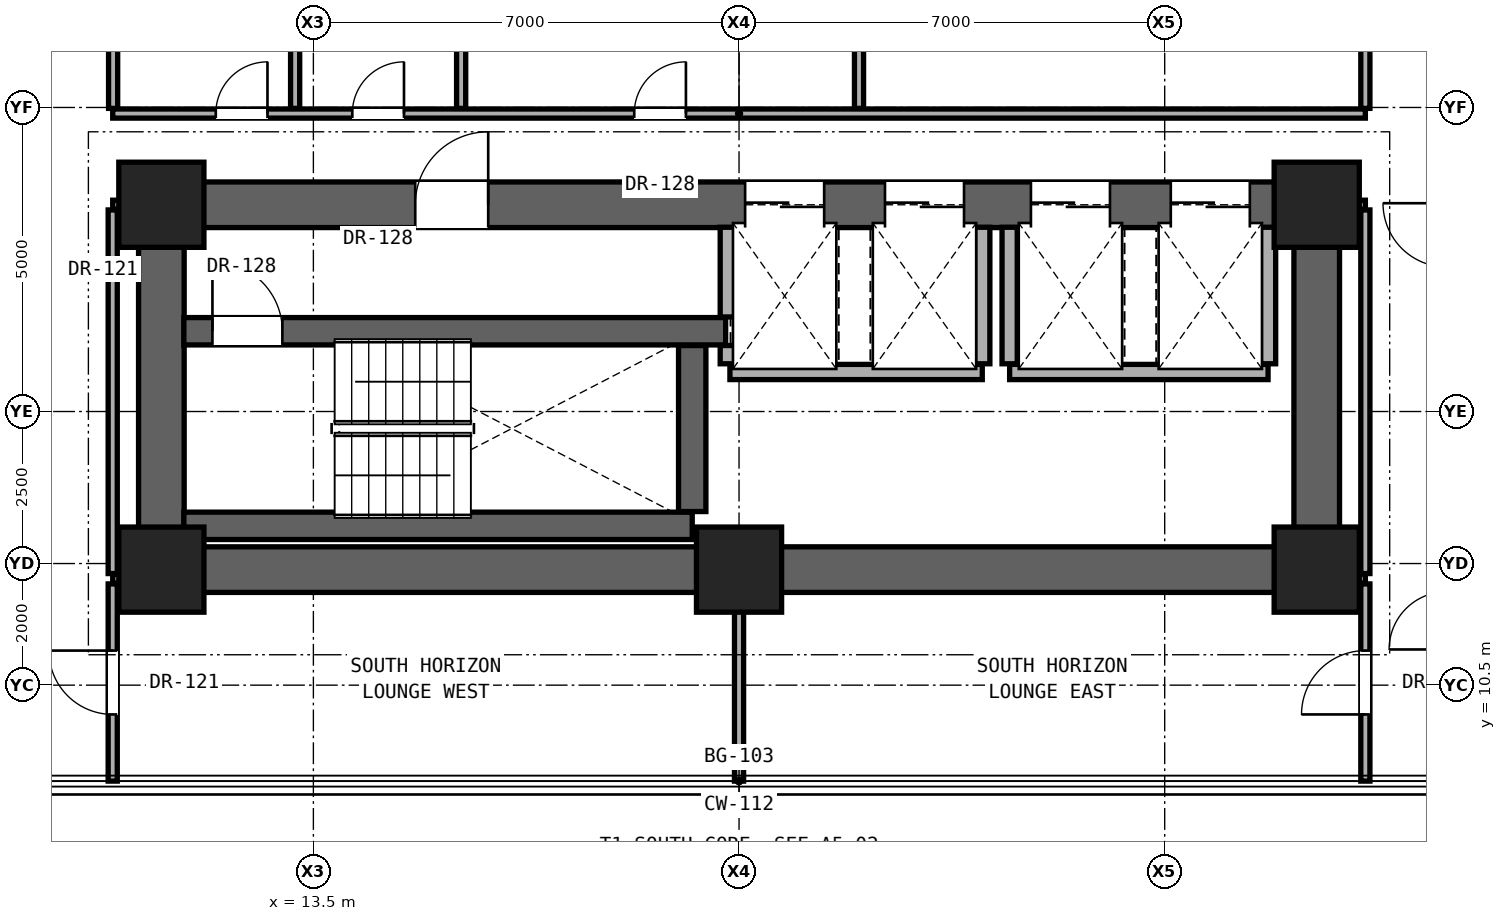
"""IFC4 building model, lengths in metres.
Left out: names, types, materials, properties, quantities, classifications, styles, units other than length and angle.
Written with IfcOpenShell. Run it as: python <this file> out.ifc"""

import sys

from ifc_helpers import new_model, si_unit, direction, frame, frame_2d, origin, origin_2d, place, context, subcontext, project, spatial, rectangle, extrude, element, fill, save


model = new_model("IFC4")
c1 = context("Model", 3, precision=1e-05, world=origin(), true_north=direction((0.0, 1.0)))
c2 = subcontext(c1, "Body", "Model", "MODEL_VIEW")
j1 = project(units=[si_unit("LENGTHUNIT", "METRE"), si_unit("PLANEANGLEUNIT", "RADIAN")], contexts=[c1])
p1 = place(None, origin())
s1 = spatial("IfcSite", under=j1, at=p1, CompositionType="ELEMENT")
p2 = place(p1, origin())
s2 = spatial("IfcBuilding", under=s1, at=p2, CompositionType="ELEMENT")
p3 = place(p2, frame((0.0, 0.0, 25.7)))
s3 = spatial("IfcBuildingStorey", under=s2, at=p3, CompositionType="ELEMENT", Elevation=25.7)
for number, where, z_axis, x_axis in (
    (1, (11.0, 12.4, 0.0), (0.0, 0.0, 1.0), (1.0, 0.0, 0.0)),
    (2, (20.5, 12.4, 0.0), (0.0, 0.0, 1.0), (1.0, 0.0, 0.0)),
    (3, (30.0, 12.4, 0.0), (0.0, 0.0, 1.0), (1.0, 0.0, 0.0)),
    (4, (11.0, 18.4, 0.0), (0.0, 0.0, 1.0), (1.0, 0.0, 0.0)),
    (5, (30.0, 18.4, 0.0), (0.0, 0.0, 1.0), (1.0, 0.0, 0.0)),
):
    element("IfcColumn", number, at=place(p3, frame(where, z_axis=z_axis, x_axis=x_axis)), inside=s3, PredefinedType="COLUMN", context=c2, shape_type="SweptSolid", body=[
        extrude(rectangle(XDim=1.4, YDim=1.4, at=origin_2d()), origin(), (0.0, 0.0, 1.0), 3.3),
    ])
p4 = place(p3, frame((11.0, 12.4, 0.0), z_axis=(0.0, 0.0, 1.0), x_axis=(1.0, 0.0, 0.0)))
e6 = element("IfcWall", 6, at=p4, inside=s3, PredefinedType="SHEAR", context=c2, shape_type="SweptSolid", body=[
    extrude(rectangle(XDim=19.0, YDim=0.75, at=frame_2d((9.5, 0.0))), origin(), (0.0, 0.0, 1.0), 3.06),
])
for number, where, z_axis, x_axis in (
    (7, (11.0, 12.4, 0.0), (0.0, 0.0, 1.0), (0.0, 1.0, 0.0)),
    (8, (30.0, 12.4, 0.0), (0.0, 0.0, 1.0), (0.0, 1.0, 0.0)),
):
    element("IfcWall", number, at=place(p3, frame(where, z_axis=z_axis, x_axis=x_axis)), inside=s3, PredefinedType="SHEAR", context=c2, shape_type="SweptSolid", body=[
        extrude(rectangle(XDim=6.0, YDim=0.75, at=frame_2d((3.0, 0.0))), origin(), (0.0, 0.0, 1.0), 3.06),
    ])
p5 = place(p3, frame((11.0, 18.4, 0.0), z_axis=(0.0, 0.0, 1.0), x_axis=(1.0, 0.0, 0.0)))
e9 = element("IfcWall", 9, at=p5, inside=s3, PredefinedType="SHEAR", context=c2, shape_type="SweptSolid", body=[
    extrude(rectangle(XDim=19.0, YDim=0.75, at=frame_2d((9.5, 0.0))), origin(), (0.0, 0.0, 1.0), 3.06),
])
p6 = place(p5, frame((4.175, 0.0, 0.0)))
e10 = element("IfcOpeningElement", 10, at=p6, cuts=e9, PredefinedType="OPENING", context=c2, shape_type="SweptSolid", body=[
    extrude(rectangle(XDim=1.2, YDim=2.25, at=frame_2d((0.6, 1.125))), frame((0.0, 0.385, 0.0), z_axis=(0.0, -1.0, 0.0), x_axis=(1.0, 0.0, 0.0)), (0.0, 0.0, 1.0), 0.77),
])
p7 = place(p5, frame((9.6, 0.0, 0.0)))
e11 = element("IfcOpeningElement", 11, at=p7, cuts=e9, PredefinedType="OPENING", context=c2, shape_type="SweptSolid", body=[
    extrude(rectangle(XDim=1.3, YDim=2.3, at=frame_2d((0.65, 1.15))), frame((0.0, 0.385, 0.0), z_axis=(0.0, -1.0, 0.0), x_axis=(1.0, 0.0, 0.0)), (0.0, 0.0, 1.0), 0.77),
])
p8 = place(p5, frame((11.9, 0.0, 0.0)))
e12 = element("IfcOpeningElement", 12, at=p8, cuts=e9, PredefinedType="OPENING", context=c2, shape_type="SweptSolid", body=[
    extrude(rectangle(XDim=1.3, YDim=2.3, at=frame_2d((0.65, 1.15))), frame((0.0, 0.385, 0.0), z_axis=(0.0, -1.0, 0.0), x_axis=(1.0, 0.0, 0.0)), (0.0, 0.0, 1.0), 0.77),
])
p9 = place(p5, frame((14.3, 0.0, 0.0)))
e13 = element("IfcOpeningElement", 13, at=p9, cuts=e9, PredefinedType="OPENING", context=c2, shape_type="SweptSolid", body=[
    extrude(rectangle(XDim=1.3, YDim=2.3, at=frame_2d((0.65, 1.15))), frame((0.0, 0.385, 0.0), z_axis=(0.0, -1.0, 0.0), x_axis=(1.0, 0.0, 0.0)), (0.0, 0.0, 1.0), 0.77),
])
p10 = place(p5, frame((16.6, 0.0, 0.0)))
e14 = element("IfcOpeningElement", 14, at=p10, cuts=e9, PredefinedType="OPENING", context=c2, shape_type="SweptSolid", body=[
    extrude(rectangle(XDim=1.3, YDim=2.3, at=frame_2d((0.65, 1.15))), frame((0.0, 0.385, 0.0), z_axis=(0.0, -1.0, 0.0), x_axis=(1.0, 0.0, 0.0)), (0.0, 0.0, 1.0), 0.77),
])
for number, where, z_axis, x_axis in (
    (15, (10.2, 12.25, 0.0), (0.0, 0.0, 1.0), (1.0, 0.0, 0.0)),
    (16, (30.37, 12.25, 0.0), (0.0, 0.0, 1.0), (1.0, 0.0, 0.0)),
):
    element("IfcWall", number, at=place(p3, frame(where, z_axis=z_axis, x_axis=x_axis)), inside=s3, PredefinedType="PARTITIONING", context=c2, shape_type="SweptSolid", body=[
        extrude(rectangle(XDim=0.43, YDim=0.15, at=frame_2d((0.215, 0.0))), origin(), (0.0, 0.0, 1.0), 3.06),
    ])
p11 = place(p3, frame((11.37, 13.12, 0.0), z_axis=(0.0, 0.0, 1.0), x_axis=(1.0, 0.0, 0.0)))
e17 = element("IfcWall", 17, at=p11, inside=s3, PredefinedType="SHEAR", context=c2, shape_type="SweptSolid", body=[
    extrude(rectangle(XDim=8.36, YDim=0.45, at=frame_2d((4.18, 0.0))), origin(), (0.0, 0.0, 1.0), 3.06),
])
p12 = place(p3, frame((20.35, 15.65, 0.0), z_axis=(0.0, 0.0, 1.0), x_axis=(1.0, 0.0, 0.0)))
e18 = element("IfcWall", 18, at=p12, inside=s3, PredefinedType="SOLIDWALL", context=c2, shape_type="SweptSolid", body=[
    extrude(rectangle(XDim=4.15, YDim=0.25, at=frame_2d((2.075, 0.0))), origin(), (0.0, 0.0, 1.0), 3.06),
])
p13 = place(p3, frame((24.95, 15.65, 0.0), z_axis=(0.0, 0.0, 1.0), x_axis=(1.0, 0.0, 0.0)))
e19 = element("IfcWall", 19, at=p13, inside=s3, PredefinedType="SOLIDWALL", context=c2, shape_type="SweptSolid", body=[
    extrude(rectangle(XDim=4.25, YDim=0.25, at=frame_2d((2.125, 0.0))), origin(), (0.0, 0.0, 1.0), 3.06),
])
p14 = place(p3, frame((11.37, 16.32, 0.0), z_axis=(0.0, 0.0, 1.0), x_axis=(1.0, 0.0, 0.0)))
e20 = element("IfcWall", 20, at=p14, inside=s3, PredefinedType="SHEAR", context=c2, shape_type="SweptSolid", body=[
    extrude(rectangle(XDim=8.91, YDim=0.45, at=frame_2d((4.455, 0.0))), origin(), (0.0, 0.0, 1.0), 3.06),
])
p15 = place(p14, frame((0.47, 0.0, 0.0)))
e21 = element("IfcOpeningElement", 21, at=p15, cuts=e20, PredefinedType="OPENING", context=c2, shape_type="SweptSolid", body=[
    extrude(rectangle(XDim=1.15, YDim=2.2, at=frame_2d((0.575, 1.1))), frame((0.0, 0.235, 0.0), z_axis=(0.0, -1.0, 0.0), x_axis=(1.0, 0.0, 0.0)), (0.0, 0.0, 1.0), 0.47),
])
for number, where, z_axis, x_axis in (
    (22, (10.2, 18.4, 0.0), (0.0, 0.0, 1.0), (1.0, 0.0, 0.0)),
    (23, (30.37, 18.4, 0.0), (0.0, 0.0, 1.0), (1.0, 0.0, 0.0)),
):
    element("IfcWall", number, at=place(p3, frame(where, z_axis=z_axis, x_axis=x_axis)), inside=s3, PredefinedType="PARTITIONING", context=c2, shape_type="SweptSolid", body=[
        extrude(rectangle(XDim=0.43, YDim=0.15, at=frame_2d((0.215, 0.0))), origin(), (0.0, 0.0, 1.0), 2.436),
    ])
p16 = place(p3, frame((10.2, 19.9, 0.0), z_axis=(0.0, 0.0, 1.0), x_axis=(1.0, 0.0, 0.0)))
e24 = element("IfcWall", 24, at=p16, inside=s3, PredefinedType="PARTITIONING", context=c2, shape_type="SweptSolid", body=[
    extrude(rectangle(XDim=20.6, YDim=0.15, at=frame_2d((10.3, 0.0))), origin(), (0.0, 0.0, 1.0), 2.104),
])
p17 = place(p16, frame((1.695, 0.0, 0.0)))
e25 = element("IfcOpeningElement", 25, at=p17, cuts=e24, PredefinedType="OPENING", context=c2, shape_type="SweptSolid", body=[
    extrude(rectangle(XDim=0.85, YDim=2.01, at=frame_2d((0.425, 1.005))), frame((0.0, 0.085, 0.0), z_axis=(0.0, -1.0, 0.0), x_axis=(1.0, 0.0, 0.0)), (0.0, 0.0, 1.0), 0.17),
])
p18 = place(p16, frame((3.94, 0.0, 0.0)))
e26 = element("IfcOpeningElement", 26, at=p18, cuts=e24, PredefinedType="OPENING", context=c2, shape_type="SweptSolid", body=[
    extrude(rectangle(XDim=0.85, YDim=2.01, at=frame_2d((0.425, 1.005))), frame((0.0, 0.085, 0.0), z_axis=(0.0, -1.0, 0.0), x_axis=(1.0, 0.0, 0.0)), (0.0, 0.0, 1.0), 0.17),
])
p19 = place(p16, frame((8.576, 0.0, 0.0)))
e27 = element("IfcOpeningElement", 27, at=p19, cuts=e24, PredefinedType="OPENING", context=c2, shape_type="SweptSolid", body=[
    extrude(rectangle(XDim=0.85, YDim=2.01, at=frame_2d((0.425, 1.005))), frame((0.0, 0.085, 0.0), z_axis=(0.0, -1.0, 0.0), x_axis=(1.0, 0.0, 0.0)), (0.0, 0.0, 1.0), 0.17),
])
p20 = place(p3, frame((10.2, 8.922, 0.0), z_axis=(0.0, 0.0, 1.0), x_axis=(0.0, 1.0, 0.0)))
e28 = element("IfcWall", 28, at=p20, inside=s3, PredefinedType="PARTITIONING", context=c2, shape_type="SweptSolid", body=[
    extrude(rectangle(XDim=3.243, YDim=0.15, at=frame_2d((1.622, 0.0))), origin(), (0.0, 0.0, 1.0), 3.06),
])
p21 = place(p20, frame((1.096, 0.0, 0.0)))
e29 = element("IfcOpeningElement", 29, at=p21, cuts=e28, PredefinedType="OPENING", context=c2, shape_type="SweptSolid", body=[
    extrude(rectangle(XDim=1.05, YDim=2.2, at=frame_2d((0.525, 1.1))), frame((0.0, 0.085, 0.0), z_axis=(0.0, -1.0, 0.0), x_axis=(1.0, 0.0, 0.0)), (0.0, 0.0, 1.0), 0.17),
])
p22 = place(p3, frame((10.2, 12.335, 0.0), z_axis=(0.0, 0.0, 1.0), x_axis=(0.0, 1.0, 0.0)))
e30 = element("IfcWall", 30, at=p22, inside=s3, PredefinedType="PARTITIONING", context=c2, shape_type="SweptSolid", body=[
    extrude(rectangle(XDim=5.98, YDim=0.15, at=frame_2d((2.99, 0.0))), origin(), (0.0, 0.0, 1.0), 2.436),
])
for number, where, z_axis, x_axis in (
    (31, (10.207, 19.985, 0.0), (0.0, 0.0, 1.0), (0.0, 1.0, 0.0)),
    (32, (13.2, 19.985, 0.0), (0.0, 0.0, 1.0), (0.0, 1.0, 0.0)),
):
    element("IfcWall", number, at=place(p3, frame(where, z_axis=z_axis, x_axis=x_axis)), inside=s3, PredefinedType="PARTITIONING", context=c2, shape_type="SweptSolid", body=[
        extrude(rectangle(XDim=2.78, YDim=0.15, at=frame_2d((1.39, 0.0))), origin(), (0.0, 0.0, 1.0), 3.06),
    ])
p23 = place(p3, frame((15.93, 19.985, 0.0), z_axis=(0.0, 0.0, 1.0), x_axis=(0.0, 1.0, 0.0)))
e33 = element("IfcWall", 33, at=p23, inside=s3, PredefinedType="PARTITIONING", context=c2, shape_type="SweptSolid", body=[
    extrude(rectangle(XDim=2.78, YDim=0.15, at=frame_2d((1.39, 0.0))), origin(), (0.0, 0.0, 1.0), 2.589),
])
p24 = place(p3, frame((19.73, 13.355, 0.0), z_axis=(0.0, 0.0, 1.0), x_axis=(0.0, 1.0, 0.0)))
e34 = element("IfcWall", 34, at=p24, inside=s3, PredefinedType="SHEAR", context=c2, shape_type="SweptSolid", body=[
    extrude(rectangle(XDim=2.73, YDim=0.45, at=frame_2d((1.365, 0.0))), origin(), (0.0, 0.0, 1.0), 3.06),
])
p25 = place(p3, frame((20.315, 15.785, 0.0), z_axis=(0.0, 0.0, 1.0), x_axis=(0.0, 1.0, 0.0)))
e35 = element("IfcWall", 35, at=p25, inside=s3, PredefinedType="SOLIDWALL", context=c2, shape_type="SweptSolid", body=[
    extrude(rectangle(XDim=0.3, YDim=0.25, at=frame_2d((0.15, 0.0))), origin(), (0.0, 0.0, 1.0), 3.06),
])
p26 = place(p3, frame((20.315, 16.555, 0.0), z_axis=(0.0, 0.0, 1.0), x_axis=(0.0, 1.0, 0.0)))
e36 = element("IfcWall", 36, at=p26, inside=s3, PredefinedType="SOLIDWALL", context=c2, shape_type="SweptSolid", body=[
    extrude(rectangle(XDim=1.475, YDim=0.25, at=frame_2d((0.738, 0.0))), origin(), (0.0, 0.0, 1.0), 3.06),
])
p27 = place(p3, frame((20.5, 8.922, 0.0), z_axis=(0.0, 0.0, 1.0), x_axis=(0.0, 1.0, 0.0)))
e37 = element("IfcWall", 37, at=p27, inside=s3, PredefinedType="PARTITIONING", context=c2, shape_type="SweptSolid", body=[
    extrude(rectangle(XDim=3.108, YDim=0.15, at=frame_2d((1.554, 0.0))), origin(), (0.0, 0.0, 1.0), 3.06),
])
p28 = place(p3, frame((22.473, 19.985, 0.0), z_axis=(0.0, 0.0, 1.0), x_axis=(0.0, 1.0, 0.0)))
e38 = element("IfcWall", 38, at=p28, inside=s3, PredefinedType="PARTITIONING", context=c2, shape_type="SweptSolid", body=[
    extrude(rectangle(XDim=13.03, YDim=0.15, at=frame_2d((6.515, 0.0))), origin(), (0.0, 0.0, 1.0), 2.104),
])
for number, where, z_axis, x_axis in (
    (39, (24.5, 15.785, 0.0), (0.0, 0.0, 1.0), (0.0, 1.0, 0.0)),
    (40, (24.95, 15.785, 0.0), (0.0, 0.0, 1.0), (0.0, 1.0, 0.0)),
    (41, (29.2, 15.785, 0.0), (0.0, 0.0, 1.0), (0.0, 1.0, 0.0)),
):
    element("IfcWall", number, at=place(p3, frame(where, z_axis=z_axis, x_axis=x_axis)), inside=s3, PredefinedType="SOLIDWALL", context=c2, shape_type="SweptSolid", body=[
        extrude(rectangle(XDim=2.245, YDim=0.25, at=frame_2d((1.123, 0.0))), origin(), (0.0, 0.0, 1.0), 3.06),
    ])
p29 = place(p3, frame((30.8, 8.922, 0.0), z_axis=(0.0, 0.0, 1.0), x_axis=(0.0, 1.0, 0.0)))
e42 = element("IfcWall", 42, at=p29, inside=s3, PredefinedType="PARTITIONING", context=c2, shape_type="SweptSolid", body=[
    extrude(rectangle(XDim=3.243, YDim=0.15, at=frame_2d((1.622, 0.0))), origin(), (0.0, 0.0, 1.0), 3.06),
])
p30 = place(p29, frame((1.096, 0.0, 0.0)))
e43 = element("IfcOpeningElement", 43, at=p30, cuts=e42, PredefinedType="OPENING", context=c2, shape_type="SweptSolid", body=[
    extrude(rectangle(XDim=1.05, YDim=2.2, at=frame_2d((0.525, 1.1))), frame((0.0, 0.085, 0.0), z_axis=(0.0, -1.0, 0.0), x_axis=(1.0, 0.0, 0.0)), (0.0, 0.0, 1.0), 0.17),
])
p31 = place(p3, frame((30.8, 12.335, 0.0), z_axis=(0.0, 0.0, 1.0), x_axis=(0.0, 1.0, 0.0)))
e44 = element("IfcWall", 44, at=p31, inside=s3, PredefinedType="PARTITIONING", context=c2, shape_type="SweptSolid", body=[
    extrude(rectangle(XDim=5.98, YDim=0.15, at=frame_2d((2.99, 0.0))), origin(), (0.0, 0.0, 1.0), 2.436),
])
p32 = place(p3, frame((30.8, 19.985, 0.0), z_axis=(0.0, 0.0, 1.0), x_axis=(0.0, 1.0, 0.0)))
e45 = element("IfcWall", 45, at=p32, inside=s3, PredefinedType="PARTITIONING", context=c2, shape_type="SweptSolid", body=[
    extrude(rectangle(XDim=13.03, YDim=0.15, at=frame_2d((6.515, 0.0))), origin(), (0.0, 0.0, 1.0), 2.279),
])
p33 = place(p6, origin())
e46 = element("IfcDoor", 46, at=p33, inside=s3, OperationType="SINGLE_SWING_RIGHT", PredefinedType="DOOR", context=c2, shape_type="SweptSolid", body=[
    extrude(rectangle(XDim=1.2, YDim=2.25, at=frame_2d((0.6, 1.125))), frame((0.0, 0.025, 0.0), z_axis=(0.0, -1.0, 0.0), x_axis=(1.0, 0.0, 0.0)), (0.0, 0.0, 1.0), 0.05),
])
fill(e10, e46)
p34 = place(p15, origin())
e47 = element("IfcDoor", 47, at=p34, inside=s3, OperationType="SINGLE_SWING_LEFT", PredefinedType="DOOR", context=c2, shape_type="SweptSolid", body=[
    extrude(rectangle(XDim=1.15, YDim=2.2, at=frame_2d((0.575, 1.1))), frame((0.0, 0.025, 0.0), z_axis=(0.0, -1.0, 0.0), x_axis=(1.0, 0.0, 0.0)), (0.0, 0.0, 1.0), 0.05),
])
fill(e21, e47)
p35 = place(p17, origin())
e48 = element("IfcDoor", 48, at=p35, inside=s3, OperationType="SINGLE_SWING_RIGHT", PredefinedType="DOOR", context=c2, shape_type="SweptSolid", body=[
    extrude(rectangle(XDim=0.85, YDim=2.01, at=frame_2d((0.425, 1.005))), frame((0.0, 0.025, 0.0), z_axis=(0.0, -1.0, 0.0), x_axis=(1.0, 0.0, 0.0)), (0.0, 0.0, 1.0), 0.05),
])
fill(e25, e48)
p36 = place(p18, origin())
e49 = element("IfcDoor", 49, at=p36, inside=s3, OperationType="SINGLE_SWING_RIGHT", PredefinedType="DOOR", context=c2, shape_type="SweptSolid", body=[
    extrude(rectangle(XDim=0.85, YDim=2.01, at=frame_2d((0.425, 1.005))), frame((0.0, 0.025, 0.0), z_axis=(0.0, -1.0, 0.0), x_axis=(1.0, 0.0, 0.0)), (0.0, 0.0, 1.0), 0.05),
])
fill(e26, e49)
p37 = place(p19, origin())
e50 = element("IfcDoor", 50, at=p37, inside=s3, OperationType="SINGLE_SWING_RIGHT", PredefinedType="DOOR", context=c2, shape_type="SweptSolid", body=[
    extrude(rectangle(XDim=0.85, YDim=2.01, at=frame_2d((0.425, 1.005))), frame((0.0, 0.025, 0.0), z_axis=(0.0, -1.0, 0.0), x_axis=(1.0, 0.0, 0.0)), (0.0, 0.0, 1.0), 0.05),
])
fill(e27, e50)
p38 = place(p21, origin())
e51 = element("IfcDoor", 51, at=p38, inside=s3, OperationType="SINGLE_SWING_RIGHT", PredefinedType="DOOR", context=c2, shape_type="SweptSolid", body=[
    extrude(rectangle(XDim=1.05, YDim=2.2, at=frame_2d((0.525, 1.1))), frame((0.0, 0.025, 0.0), z_axis=(0.0, -1.0, 0.0), x_axis=(1.0, 0.0, 0.0)), (0.0, 0.0, 1.0), 0.05),
])
fill(e29, e51)
p39 = place(p30, origin())
e52 = element("IfcDoor", 52, at=p39, inside=s3, OperationType="SINGLE_SWING_LEFT", PredefinedType="DOOR", context=c2, shape_type="SweptSolid", body=[
    extrude(rectangle(XDim=1.05, YDim=2.2, at=frame_2d((0.525, 1.1))), frame((0.0, 0.025, 0.0), z_axis=(0.0, -1.0, 0.0), x_axis=(1.0, 0.0, 0.0)), (0.0, 0.0, 1.0), 0.05),
])
fill(e43, e52)
p40 = place(p7, origin())
e53 = element("IfcDoor", 53, at=p40, inside=s3, OperationType="DOUBLE_DOOR_SLIDING", PredefinedType="DOOR", context=c2, shape_type="SweptSolid", body=[
    extrude(rectangle(XDim=1.3, YDim=2.3, at=frame_2d((0.65, 1.15))), frame((0.0, 0.025, 0.0), z_axis=(0.0, -1.0, 0.0), x_axis=(1.0, 0.0, 0.0)), (0.0, 0.0, 1.0), 0.05),
])
fill(e11, e53)
p41 = place(p8, origin())
e54 = element("IfcDoor", 54, at=p41, inside=s3, OperationType="DOUBLE_DOOR_SLIDING", PredefinedType="DOOR", context=c2, shape_type="SweptSolid", body=[
    extrude(rectangle(XDim=1.3, YDim=2.3, at=frame_2d((0.65, 1.15))), frame((0.0, 0.025, 0.0), z_axis=(0.0, -1.0, 0.0), x_axis=(1.0, 0.0, 0.0)), (0.0, 0.0, 1.0), 0.05),
])
fill(e12, e54)
p42 = place(p9, origin())
e55 = element("IfcDoor", 55, at=p42, inside=s3, OperationType="DOUBLE_DOOR_SLIDING", PredefinedType="DOOR", context=c2, shape_type="SweptSolid", body=[
    extrude(rectangle(XDim=1.3, YDim=2.3, at=frame_2d((0.65, 1.15))), frame((0.0, 0.025, 0.0), z_axis=(0.0, -1.0, 0.0), x_axis=(1.0, 0.0, 0.0)), (0.0, 0.0, 1.0), 0.05),
])
fill(e13, e55)
p43 = place(p10, origin())
e56 = element("IfcDoor", 56, at=p43, inside=s3, OperationType="DOUBLE_DOOR_SLIDING", PredefinedType="DOOR", context=c2, shape_type="SweptSolid", body=[
    extrude(rectangle(XDim=1.3, YDim=2.3, at=frame_2d((0.65, 1.15))), frame((0.0, 0.025, 0.0), z_axis=(0.0, -1.0, 0.0), x_axis=(1.0, 0.0, 0.0)), (0.0, 0.0, 1.0), 0.05),
])
fill(e14, e56)
save(model, sys.argv[1])
